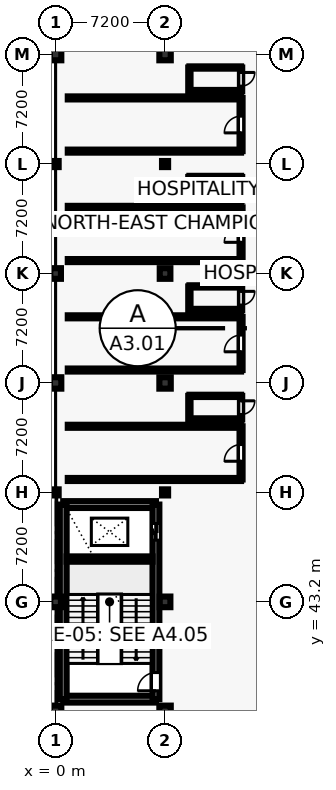
"""IFC4 building model, lengths in metres.
Left out: names, types, materials, properties, quantities, classifications, styles, units other than length and angle.
Written with IfcOpenShell. Run it as: python <this file> out.ifc"""

import sys

from ifc_helpers import new_model, si_unit, direction, frame, frame_2d, origin, origin_2d, place, context, subcontext, project, spatial, rectangle, hollow_rectangle, extrude, element, fill, save


model = new_model("IFC4")
c1 = context("Model", 3, precision=1e-05, world=origin(), true_north=direction((0.0, 1.0)))
c2 = subcontext(c1, "Body", "Model", "MODEL_VIEW")
j1 = project(units=[si_unit("LENGTHUNIT", "METRE"), si_unit("PLANEANGLEUNIT", "RADIAN")], contexts=[c1])
p1 = place(None, origin())
s1 = spatial("IfcSite", under=j1, at=p1, CompositionType="ELEMENT")
p2 = place(p1, origin())
s2 = spatial("IfcBuilding", under=s1, at=p2, CompositionType="ELEMENT")
p3 = place(p2, frame((0.0, 0.0, 9.6)))
s3 = spatial("IfcBuildingStorey", under=s2, at=p3, CompositionType="ELEMENT", Elevation=9.6)
p4 = place(p3, frame((0.0, 36.0, 0.0), z_axis=(0.0, 0.0, 1.0), x_axis=(1.0, 0.0, 0.0)))
e1 = element("IfcColumn", 1, at=p4, inside=s3, PredefinedType="COLUMN", context=c2, shape_type="SweptSolid", body=[
    extrude(rectangle(XDim=0.75, YDim=0.75, at=origin_2d()), origin(), (0.0, 0.0, 1.0), 4.2),
])
p5 = place(p3, frame((0.0, 43.2, 0.0), z_axis=(0.0, 0.0, 1.0), x_axis=(1.0, 0.0, 0.0)))
e2 = element("IfcColumn", 2, at=p5, inside=s3, PredefinedType="COLUMN", context=c2, shape_type="SweptSolid", body=[
    extrude(rectangle(XDim=0.7, YDim=0.7, at=origin_2d()), origin(), (0.0, 0.0, 1.0), 4.2),
])
p6 = place(p3, frame((0.0, 50.4, 0.0), z_axis=(0.0, 0.0, 1.0), x_axis=(1.0, 0.0, 0.0)))
e3 = element("IfcColumn", 3, at=p6, inside=s3, PredefinedType="COLUMN", context=c2, shape_type="SweptSolid", body=[
    extrude(hollow_rectangle(XDim=0.4, YDim=0.4, WallThickness=0.02, at=origin_2d()), origin(), (0.0, 0.0, 1.0), 4.2),
])
p7 = place(p3, frame((0.0, 57.6, 0.0), z_axis=(0.0, 0.0, 1.0), x_axis=(1.0, 0.0, 0.0)))
e4 = element("IfcColumn", 4, at=p7, inside=s3, PredefinedType="COLUMN", context=c2, shape_type="SweptSolid", body=[
    extrude(rectangle(XDim=0.75, YDim=0.75, at=origin_2d()), origin(), (0.0, 0.0, 1.0), 4.2),
])
p8 = place(p3, frame((0.0, 64.8, 0.0), z_axis=(0.0, 0.0, 1.0), x_axis=(1.0, 0.0, 0.0)))
e5 = element("IfcColumn", 5, at=p8, inside=s3, PredefinedType="COLUMN", context=c2, shape_type="SweptSolid", body=[
    extrude(rectangle(XDim=0.7, YDim=0.7, at=origin_2d()), origin(), (0.0, 0.0, 1.0), 4.2),
])
p9 = place(p3, frame((0.0, 72.0, 0.0), z_axis=(0.0, 0.0, 1.0), x_axis=(1.0, 0.0, 0.0)))
e6 = element("IfcColumn", 6, at=p9, inside=s3, PredefinedType="COLUMN", context=c2, shape_type="SweptSolid", body=[
    extrude(hollow_rectangle(XDim=0.4, YDim=0.4, WallThickness=0.02, at=origin_2d()), origin(), (0.0, 0.0, 1.0), 4.2),
])
for number, where, z_axis, x_axis in (
    (7, (0.0, 79.2, 0.0), (0.0, 0.0, 1.0), (1.0, 0.0, 0.0)),
    (8, (7.2, 36.0, 0.0), (0.0, 0.0, 1.0), (1.0, 0.0, 0.0)),
):
    element("IfcColumn", number, at=place(p3, frame(where, z_axis=z_axis, x_axis=x_axis)), inside=s3, PredefinedType="COLUMN", context=c2, shape_type="SweptSolid", body=[
        extrude(rectangle(XDim=0.75, YDim=0.75, at=origin_2d()), origin(), (0.0, 0.0, 1.0), 4.2),
    ])
p10 = place(p3, frame((7.2, 43.2, 0.0), z_axis=(0.0, 0.0, 1.0), x_axis=(1.0, 0.0, 0.0)))
e9 = element("IfcColumn", 9, at=p10, inside=s3, PredefinedType="COLUMN", context=c2, shape_type="SweptSolid", body=[
    extrude(rectangle(XDim=0.7, YDim=0.7, at=origin_2d()), origin(), (0.0, 0.0, 1.0), 4.2),
])
p11 = place(p3, frame((7.2, 50.4, 0.0), z_axis=(0.0, 0.0, 1.0), x_axis=(1.0, 0.0, 0.0)))
e10 = element("IfcColumn", 10, at=p11, inside=s3, PredefinedType="COLUMN", context=c2, shape_type="SweptSolid", body=[
    extrude(hollow_rectangle(XDim=0.4, YDim=0.4, WallThickness=0.02, at=origin_2d()), origin(), (0.0, 0.0, 1.0), 4.2),
])
p12 = place(p3, frame((7.2, 57.6, 0.0), z_axis=(0.0, 0.0, 1.0), x_axis=(1.0, 0.0, 0.0)))
e11 = element("IfcColumn", 11, at=p12, inside=s3, PredefinedType="COLUMN", context=c2, shape_type="SweptSolid", body=[
    extrude(rectangle(XDim=0.75, YDim=0.75, at=origin_2d()), origin(), (0.0, 0.0, 1.0), 4.2),
])
p13 = place(p3, frame((7.2, 64.8, 0.0), z_axis=(0.0, 0.0, 1.0), x_axis=(1.0, 0.0, 0.0)))
e12 = element("IfcColumn", 12, at=p13, inside=s3, PredefinedType="COLUMN", context=c2, shape_type="SweptSolid", body=[
    extrude(rectangle(XDim=0.7, YDim=0.7, at=origin_2d()), origin(), (0.0, 0.0, 1.0), 4.2),
])
p14 = place(p3, frame((7.2, 72.0, 0.0), z_axis=(0.0, 0.0, 1.0), x_axis=(1.0, 0.0, 0.0)))
e13 = element("IfcColumn", 13, at=p14, inside=s3, PredefinedType="COLUMN", context=c2, shape_type="SweptSolid", body=[
    extrude(hollow_rectangle(XDim=0.4, YDim=0.4, WallThickness=0.02, at=origin_2d()), origin(), (0.0, 0.0, 1.0), 4.2),
])
p15 = place(p3, frame((7.2, 79.2, 0.0), z_axis=(0.0, 0.0, 1.0), x_axis=(1.0, 0.0, 0.0)))
e14 = element("IfcColumn", 14, at=p15, inside=s3, PredefinedType="COLUMN", context=c2, shape_type="SweptSolid", body=[
    extrude(rectangle(XDim=0.75, YDim=0.75, at=origin_2d()), origin(), (0.0, 0.0, 1.0), 4.2),
])
for number, where, z_axis, x_axis in (
    (15, (0.5, 36.8, 0.0), (0.0, 0.0, 1.0), (1.0, 0.0, 0.0)),
    (16, (0.5, 49.6, 0.0), (0.0, 0.0, 1.0), (1.0, 0.0, 0.0)),
):
    element("IfcWall", number, at=place(p3, frame(where, z_axis=z_axis, x_axis=x_axis)), inside=s3, PredefinedType="SHEAR", context=c2, shape_type="SweptSolid", body=[
        extrude(rectangle(XDim=6.1, YDim=0.45, at=frame_2d((3.05, 0.0))), origin(), (0.0, 0.0, 1.0), 3.88),
    ])
p16 = place(p3, frame((0.5, 36.8, 0.0), z_axis=(0.0, 0.0, 1.0), x_axis=(0.0, 1.0, 0.0)))
e17 = element("IfcWall", 17, at=p16, inside=s3, PredefinedType="SHEAR", context=c2, shape_type="SweptSolid", body=[
    extrude(rectangle(XDim=12.8, YDim=0.45, at=frame_2d((6.4, 0.0))), origin(), (0.0, 0.0, 1.0), 3.88),
])
p17 = place(p3, frame((6.6, 36.8, 0.0), z_axis=(0.0, 0.0, 1.0), x_axis=(0.0, 1.0, 0.0)))
e18 = element("IfcWall", 18, at=p17, inside=s3, PredefinedType="SHEAR", context=c2, shape_type="SweptSolid", body=[
    extrude(rectangle(XDim=12.8, YDim=0.45, at=frame_2d((6.4, 0.0))), origin(), (0.0, 0.0, 1.0), 3.88),
])
p18 = place(p17, frame((0.55, 0.0, 0.0)))
e19 = element("IfcOpeningElement", 19, at=p18, cuts=e18, PredefinedType="OPENING", context=c2, shape_type="SweptSolid", body=[
    extrude(rectangle(XDim=1.2, YDim=2.25, at=frame_2d((0.6, 1.125))), frame((0.0, 0.235, 0.0), z_axis=(0.0, -1.0, 0.0), x_axis=(1.0, 0.0, 0.0)), (0.0, 0.0, 1.0), 0.47),
])
p19 = place(p17, frame((10.458, 0.0, 0.0)))
e20 = element("IfcOpeningElement", 20, at=p19, cuts=e18, PredefinedType="OPENING", context=c2, shape_type="SweptSolid", body=[
    extrude(rectangle(XDim=1.1, YDim=2.2, at=frame_2d((0.55, 1.1))), frame((0.0, 0.235, 0.0), z_axis=(0.0, -1.0, 0.0), x_axis=(1.0, 0.0, 0.0)), (0.0, 0.0, 1.0), 0.47),
])
p20 = place(p3, frame((0.725, 46.016, 0.0), z_axis=(0.0, 0.0, 1.0), x_axis=(1.0, 0.0, 0.0)))
e21 = element("IfcWall", 21, at=p20, inside=s3, PredefinedType="SHEAR", context=c2, shape_type="SweptSolid", body=[
    extrude(rectangle(XDim=5.65, YDim=0.35, at=frame_2d((2.825, 0.0))), origin(), (0.0, 0.0, 1.0), 3.88),
])
p21 = place(p3, frame((0.8, 51.25, 0.0), z_axis=(0.0, 0.0, 1.0), x_axis=(1.0, 0.0, 0.0)))
e22 = element("IfcWall", 22, at=p21, inside=s3, PredefinedType="PARTITIONING", context=c2, shape_type="SweptSolid", body=[
    extrude(rectangle(XDim=11.4, YDim=0.2, at=frame_2d((5.7, 0.0))), origin(), (0.0, 0.0, 1.0), 2.94),
])
p22 = place(p3, frame((12.2, 51.25, 0.0), z_axis=(0.0, 0.0, 1.0), x_axis=(0.0, 1.0, 0.0)))
e23 = element("IfcWall", 23, at=p22, inside=s3, PredefinedType="PARTITIONING", context=c2, shape_type="SweptSolid", body=[
    extrude(rectangle(XDim=3.5, YDim=0.2, at=frame_2d((1.75, 0.0))), origin(), (0.0, 0.0, 1.0), 2.94),
])
p23 = place(p22, frame((1.2, 0.0, 0.0)))
e24 = element("IfcOpeningElement", 24, at=p23, cuts=e23, PredefinedType="OPENING", context=c2, shape_type="SweptSolid", body=[
    extrude(rectangle(XDim=1.1, YDim=2.25, at=frame_2d((0.55, 1.125))), frame((0.0, 0.11, 0.0), z_axis=(0.0, -1.0, 0.0), x_axis=(1.0, 0.0, 0.0)), (0.0, 0.0, 1.0), 0.22),
])
p24 = place(p3, frame((12.2, 54.75, 0.0), z_axis=(0.0, 0.0, 1.0), x_axis=(-1.0, 0.0, 0.0)))
e25 = element("IfcWall", 25, at=p24, inside=s3, PredefinedType="PARTITIONING", context=c2, shape_type="SweptSolid", body=[
    extrude(rectangle(XDim=11.4, YDim=0.2, at=frame_2d((5.7, 0.0))), origin(), (0.0, 0.0, 1.0), 2.94),
])
p25 = place(p3, frame((8.8, 55.2, 0.0), z_axis=(0.0, 0.0, 1.0), x_axis=(1.0, 0.0, 0.0)))
e26 = element("IfcWall", 26, at=p25, inside=s3, PredefinedType="PARTITIONING", context=c2, shape_type="SweptSolid", body=[
    extrude(rectangle(XDim=3.4, YDim=0.15, at=frame_2d((1.7, 0.0))), origin(), (0.0, 0.0, 1.0), 2.94),
])
p26 = place(p3, frame((12.2, 55.2, 0.0), z_axis=(0.0, 0.0, 1.0), x_axis=(0.0, 1.0, 0.0)))
e27 = element("IfcWall", 27, at=p26, inside=s3, PredefinedType="PARTITIONING", context=c2, shape_type="SweptSolid", body=[
    extrude(rectangle(XDim=1.55, YDim=0.15, at=frame_2d((0.775, 0.0))), origin(), (0.0, 0.0, 1.0), 2.94),
])
p27 = place(p26, frame((0.325, 0.0, 0.0)))
e28 = element("IfcOpeningElement", 28, at=p27, cuts=e27, PredefinedType="OPENING", context=c2, shape_type="SweptSolid", body=[
    extrude(rectangle(XDim=0.9, YDim=2.15, at=frame_2d((0.45, 1.075))), frame((0.0, 0.085, 0.0), z_axis=(0.0, -1.0, 0.0), x_axis=(1.0, 0.0, 0.0)), (0.0, 0.0, 1.0), 0.17),
])
p28 = place(p3, frame((12.2, 56.75, 0.0), z_axis=(0.0, 0.0, 1.0), x_axis=(-1.0, 0.0, 0.0)))
e29 = element("IfcWall", 29, at=p28, inside=s3, PredefinedType="PARTITIONING", context=c2, shape_type="SweptSolid", body=[
    extrude(rectangle(XDim=3.4, YDim=0.15, at=frame_2d((1.7, 0.0))), origin(), (0.0, 0.0, 1.0), 2.94),
])
p29 = place(p3, frame((8.8, 56.75, 0.0), z_axis=(0.0, 0.0, 1.0), x_axis=(0.0, -1.0, 0.0)))
e30 = element("IfcWall", 30, at=p29, inside=s3, PredefinedType="PARTITIONING", context=c2, shape_type="SweptSolid", body=[
    extrude(rectangle(XDim=1.55, YDim=0.15, at=frame_2d((0.775, 0.0))), origin(), (0.0, 0.0, 1.0), 2.94),
])
p30 = place(p3, frame((0.8, 58.45, 0.0), z_axis=(0.0, 0.0, 1.0), x_axis=(1.0, 0.0, 0.0)))
e31 = element("IfcWall", 31, at=p30, inside=s3, PredefinedType="PARTITIONING", context=c2, shape_type="SweptSolid", body=[
    extrude(rectangle(XDim=11.4, YDim=0.2, at=frame_2d((5.7, 0.0))), origin(), (0.0, 0.0, 1.0), 2.94),
])
p31 = place(p3, frame((12.2, 58.45, 0.0), z_axis=(0.0, 0.0, 1.0), x_axis=(0.0, 1.0, 0.0)))
e32 = element("IfcWall", 32, at=p31, inside=s3, PredefinedType="PARTITIONING", context=c2, shape_type="SweptSolid", body=[
    extrude(rectangle(XDim=3.5, YDim=0.2, at=frame_2d((1.75, 0.0))), origin(), (0.0, 0.0, 1.0), 2.94),
])
p32 = place(p31, frame((1.2, 0.0, 0.0)))
e33 = element("IfcOpeningElement", 33, at=p32, cuts=e32, PredefinedType="OPENING", context=c2, shape_type="SweptSolid", body=[
    extrude(rectangle(XDim=1.1, YDim=2.25, at=frame_2d((0.55, 1.125))), frame((0.0, 0.11, 0.0), z_axis=(0.0, -1.0, 0.0), x_axis=(1.0, 0.0, 0.0)), (0.0, 0.0, 1.0), 0.22),
])
p33 = place(p3, frame((12.2, 61.95, 0.0), z_axis=(0.0, 0.0, 1.0), x_axis=(-1.0, 0.0, 0.0)))
e34 = element("IfcWall", 34, at=p33, inside=s3, PredefinedType="PARTITIONING", context=c2, shape_type="SweptSolid", body=[
    extrude(rectangle(XDim=11.4, YDim=0.2, at=frame_2d((5.7, 0.0))), origin(), (0.0, 0.0, 1.0), 2.94),
])
p34 = place(p3, frame((8.8, 62.4, 0.0), z_axis=(0.0, 0.0, 1.0), x_axis=(1.0, 0.0, 0.0)))
e35 = element("IfcWall", 35, at=p34, inside=s3, PredefinedType="PARTITIONING", context=c2, shape_type="SweptSolid", body=[
    extrude(rectangle(XDim=3.4, YDim=0.15, at=frame_2d((1.7, 0.0))), origin(), (0.0, 0.0, 1.0), 2.94),
])
p35 = place(p3, frame((12.2, 62.4, 0.0), z_axis=(0.0, 0.0, 1.0), x_axis=(0.0, 1.0, 0.0)))
e36 = element("IfcWall", 36, at=p35, inside=s3, PredefinedType="PARTITIONING", context=c2, shape_type="SweptSolid", body=[
    extrude(rectangle(XDim=1.55, YDim=0.15, at=frame_2d((0.775, 0.0))), origin(), (0.0, 0.0, 1.0), 2.94),
])
p36 = place(p35, frame((0.325, 0.0, 0.0)))
e37 = element("IfcOpeningElement", 37, at=p36, cuts=e36, PredefinedType="OPENING", context=c2, shape_type="SweptSolid", body=[
    extrude(rectangle(XDim=0.9, YDim=2.15, at=frame_2d((0.45, 1.075))), frame((0.0, 0.085, 0.0), z_axis=(0.0, -1.0, 0.0), x_axis=(1.0, 0.0, 0.0)), (0.0, 0.0, 1.0), 0.17),
])
p37 = place(p3, frame((12.2, 63.95, 0.0), z_axis=(0.0, 0.0, 1.0), x_axis=(-1.0, 0.0, 0.0)))
e38 = element("IfcWall", 38, at=p37, inside=s3, PredefinedType="PARTITIONING", context=c2, shape_type="SweptSolid", body=[
    extrude(rectangle(XDim=3.4, YDim=0.15, at=frame_2d((1.7, 0.0))), origin(), (0.0, 0.0, 1.0), 2.94),
])
p38 = place(p3, frame((8.8, 63.95, 0.0), z_axis=(0.0, 0.0, 1.0), x_axis=(0.0, -1.0, 0.0)))
e39 = element("IfcWall", 39, at=p38, inside=s3, PredefinedType="PARTITIONING", context=c2, shape_type="SweptSolid", body=[
    extrude(rectangle(XDim=1.55, YDim=0.15, at=frame_2d((0.775, 0.0))), origin(), (0.0, 0.0, 1.0), 2.94),
])
p39 = place(p3, frame((0.8, 65.65, 0.0), z_axis=(0.0, 0.0, 1.0), x_axis=(1.0, 0.0, 0.0)))
e40 = element("IfcWall", 40, at=p39, inside=s3, PredefinedType="PARTITIONING", context=c2, shape_type="SweptSolid", body=[
    extrude(rectangle(XDim=11.4, YDim=0.2, at=frame_2d((5.7, 0.0))), origin(), (0.0, 0.0, 1.0), 2.94),
])
p40 = place(p3, frame((12.2, 65.65, 0.0), z_axis=(0.0, 0.0, 1.0), x_axis=(0.0, 1.0, 0.0)))
e41 = element("IfcWall", 41, at=p40, inside=s3, PredefinedType="PARTITIONING", context=c2, shape_type="SweptSolid", body=[
    extrude(rectangle(XDim=3.5, YDim=0.2, at=frame_2d((1.75, 0.0))), origin(), (0.0, 0.0, 1.0), 2.94),
])
p41 = place(p40, frame((1.2, 0.0, 0.0)))
e42 = element("IfcOpeningElement", 42, at=p41, cuts=e41, PredefinedType="OPENING", context=c2, shape_type="SweptSolid", body=[
    extrude(rectangle(XDim=1.1, YDim=2.25, at=frame_2d((0.55, 1.125))), frame((0.0, 0.11, 0.0), z_axis=(0.0, -1.0, 0.0), x_axis=(1.0, 0.0, 0.0)), (0.0, 0.0, 1.0), 0.22),
])
p42 = place(p3, frame((12.2, 69.15, 0.0), z_axis=(0.0, 0.0, 1.0), x_axis=(-1.0, 0.0, 0.0)))
e43 = element("IfcWall", 43, at=p42, inside=s3, PredefinedType="PARTITIONING", context=c2, shape_type="SweptSolid", body=[
    extrude(rectangle(XDim=11.4, YDim=0.2, at=frame_2d((5.7, 0.0))), origin(), (0.0, 0.0, 1.0), 2.94),
])
p43 = place(p3, frame((8.8, 69.6, 0.0), z_axis=(0.0, 0.0, 1.0), x_axis=(1.0, 0.0, 0.0)))
e44 = element("IfcWall", 44, at=p43, inside=s3, PredefinedType="PARTITIONING", context=c2, shape_type="SweptSolid", body=[
    extrude(rectangle(XDim=3.4, YDim=0.15, at=frame_2d((1.7, 0.0))), origin(), (0.0, 0.0, 1.0), 2.94),
])
p44 = place(p3, frame((12.2, 69.6, 0.0), z_axis=(0.0, 0.0, 1.0), x_axis=(0.0, 1.0, 0.0)))
e45 = element("IfcWall", 45, at=p44, inside=s3, PredefinedType="PARTITIONING", context=c2, shape_type="SweptSolid", body=[
    extrude(rectangle(XDim=1.55, YDim=0.15, at=frame_2d((0.775, 0.0))), origin(), (0.0, 0.0, 1.0), 2.94),
])
p45 = place(p44, frame((0.325, 0.0, 0.0)))
e46 = element("IfcOpeningElement", 46, at=p45, cuts=e45, PredefinedType="OPENING", context=c2, shape_type="SweptSolid", body=[
    extrude(rectangle(XDim=0.9, YDim=2.15, at=frame_2d((0.45, 1.075))), frame((0.0, 0.085, 0.0), z_axis=(0.0, -1.0, 0.0), x_axis=(1.0, 0.0, 0.0)), (0.0, 0.0, 1.0), 0.17),
])
p46 = place(p3, frame((12.2, 71.15, 0.0), z_axis=(0.0, 0.0, 1.0), x_axis=(-1.0, 0.0, 0.0)))
e47 = element("IfcWall", 47, at=p46, inside=s3, PredefinedType="PARTITIONING", context=c2, shape_type="SweptSolid", body=[
    extrude(rectangle(XDim=3.4, YDim=0.15, at=frame_2d((1.7, 0.0))), origin(), (0.0, 0.0, 1.0), 2.94),
])
p47 = place(p3, frame((8.8, 71.15, 0.0), z_axis=(0.0, 0.0, 1.0), x_axis=(0.0, -1.0, 0.0)))
e48 = element("IfcWall", 48, at=p47, inside=s3, PredefinedType="PARTITIONING", context=c2, shape_type="SweptSolid", body=[
    extrude(rectangle(XDim=1.55, YDim=0.15, at=frame_2d((0.775, 0.0))), origin(), (0.0, 0.0, 1.0), 2.94),
])
p48 = place(p3, frame((0.8, 72.85, 0.0), z_axis=(0.0, 0.0, 1.0), x_axis=(1.0, 0.0, 0.0)))
e49 = element("IfcWall", 49, at=p48, inside=s3, PredefinedType="PARTITIONING", context=c2, shape_type="SweptSolid", body=[
    extrude(rectangle(XDim=11.4, YDim=0.2, at=frame_2d((5.7, 0.0))), origin(), (0.0, 0.0, 1.0), 2.94),
])
p49 = place(p3, frame((12.2, 72.85, 0.0), z_axis=(0.0, 0.0, 1.0), x_axis=(0.0, 1.0, 0.0)))
e50 = element("IfcWall", 50, at=p49, inside=s3, PredefinedType="PARTITIONING", context=c2, shape_type="SweptSolid", body=[
    extrude(rectangle(XDim=3.5, YDim=0.2, at=frame_2d((1.75, 0.0))), origin(), (0.0, 0.0, 1.0), 2.94),
])
p50 = place(p49, frame((1.2, 0.0, 0.0)))
e51 = element("IfcOpeningElement", 51, at=p50, cuts=e50, PredefinedType="OPENING", context=c2, shape_type="SweptSolid", body=[
    extrude(rectangle(XDim=1.1, YDim=2.25, at=frame_2d((0.55, 1.125))), frame((0.0, 0.11, 0.0), z_axis=(0.0, -1.0, 0.0), x_axis=(1.0, 0.0, 0.0)), (0.0, 0.0, 1.0), 0.22),
])
p51 = place(p3, frame((12.2, 76.35, 0.0), z_axis=(0.0, 0.0, 1.0), x_axis=(-1.0, 0.0, 0.0)))
e52 = element("IfcWall", 52, at=p51, inside=s3, PredefinedType="PARTITIONING", context=c2, shape_type="SweptSolid", body=[
    extrude(rectangle(XDim=11.4, YDim=0.2, at=frame_2d((5.7, 0.0))), origin(), (0.0, 0.0, 1.0), 2.94),
])
p52 = place(p3, frame((8.8, 76.8, 0.0), z_axis=(0.0, 0.0, 1.0), x_axis=(1.0, 0.0, 0.0)))
e53 = element("IfcWall", 53, at=p52, inside=s3, PredefinedType="PARTITIONING", context=c2, shape_type="SweptSolid", body=[
    extrude(rectangle(XDim=3.4, YDim=0.15, at=frame_2d((1.7, 0.0))), origin(), (0.0, 0.0, 1.0), 2.94),
])
p53 = place(p3, frame((12.2, 76.8, 0.0), z_axis=(0.0, 0.0, 1.0), x_axis=(0.0, 1.0, 0.0)))
e54 = element("IfcWall", 54, at=p53, inside=s3, PredefinedType="PARTITIONING", context=c2, shape_type="SweptSolid", body=[
    extrude(rectangle(XDim=1.55, YDim=0.15, at=frame_2d((0.775, 0.0))), origin(), (0.0, 0.0, 1.0), 2.94),
])
p54 = place(p53, frame((0.325, 0.0, 0.0)))
e55 = element("IfcOpeningElement", 55, at=p54, cuts=e54, PredefinedType="OPENING", context=c2, shape_type="SweptSolid", body=[
    extrude(rectangle(XDim=0.9, YDim=2.15, at=frame_2d((0.45, 1.075))), frame((0.0, 0.085, 0.0), z_axis=(0.0, -1.0, 0.0), x_axis=(1.0, 0.0, 0.0)), (0.0, 0.0, 1.0), 0.17),
])
p55 = place(p3, frame((12.2, 78.35, 0.0), z_axis=(0.0, 0.0, 1.0), x_axis=(-1.0, 0.0, 0.0)))
e56 = element("IfcWall", 56, at=p55, inside=s3, PredefinedType="PARTITIONING", context=c2, shape_type="SweptSolid", body=[
    extrude(rectangle(XDim=3.4, YDim=0.15, at=frame_2d((1.7, 0.0))), origin(), (0.0, 0.0, 1.0), 2.94),
])
p56 = place(p3, frame((8.8, 78.35, 0.0), z_axis=(0.0, 0.0, 1.0), x_axis=(0.0, -1.0, 0.0)))
e57 = element("IfcWall", 57, at=p56, inside=s3, PredefinedType="PARTITIONING", context=c2, shape_type="SweptSolid", body=[
    extrude(rectangle(XDim=1.55, YDim=0.15, at=frame_2d((0.775, 0.0))), origin(), (0.0, 0.0, 1.0), 2.94),
])
p57 = place(p18, origin())
e58 = element("IfcDoor", 58, at=p57, inside=s3, OperationType="SINGLE_SWING_LEFT", PredefinedType="DOOR", context=c2, shape_type="SweptSolid", body=[
    extrude(rectangle(XDim=1.2, YDim=2.25, at=frame_2d((0.6, 1.125))), frame((0.0, 0.025, 0.0), z_axis=(0.0, -1.0, 0.0), x_axis=(1.0, 0.0, 0.0)), (0.0, 0.0, 1.0), 0.05),
])
fill(e19, e58)
p58 = place(p19, origin())
e59 = element("IfcDoor", 59, at=p58, inside=s3, OperationType="SLIDING_TO_RIGHT", PredefinedType="DOOR", context=c2, shape_type="SweptSolid", body=[
    extrude(rectangle(XDim=1.1, YDim=2.2, at=frame_2d((0.55, 1.1))), frame((0.0, 0.025, 0.0), z_axis=(0.0, -1.0, 0.0), x_axis=(1.0, 0.0, 0.0)), (0.0, 0.0, 1.0), 0.05),
])
fill(e20, e59)
p59 = place(p23, origin())
e60 = element("IfcDoor", 60, at=p59, inside=s3, OperationType="SINGLE_SWING_LEFT", PredefinedType="DOOR", context=c2, shape_type="SweptSolid", body=[
    extrude(rectangle(XDim=1.1, YDim=2.25, at=frame_2d((0.55, 1.125))), frame((0.0, 0.025, 0.0), z_axis=(0.0, -1.0, 0.0), x_axis=(1.0, 0.0, 0.0)), (0.0, 0.0, 1.0), 0.05),
])
fill(e24, e60)
p60 = place(p27, frame((0.9, 0.0, 0.0), z_axis=(0.0, 0.0, 1.0), x_axis=(-1.0, 0.0, 0.0)))
e61 = element("IfcDoor", 61, at=p60, inside=s3, OperationType="SINGLE_SWING_RIGHT", PredefinedType="DOOR", context=c2, shape_type="SweptSolid", body=[
    extrude(rectangle(XDim=0.9, YDim=2.15, at=frame_2d((0.45, 1.075))), frame((0.0, 0.025, 0.0), z_axis=(0.0, -1.0, 0.0), x_axis=(1.0, 0.0, 0.0)), (0.0, 0.0, 1.0), 0.05),
])
fill(e28, e61)
p61 = place(p32, origin())
e62 = element("IfcDoor", 62, at=p61, inside=s3, OperationType="SINGLE_SWING_LEFT", PredefinedType="DOOR", context=c2, shape_type="SweptSolid", body=[
    extrude(rectangle(XDim=1.1, YDim=2.25, at=frame_2d((0.55, 1.125))), frame((0.0, 0.025, 0.0), z_axis=(0.0, -1.0, 0.0), x_axis=(1.0, 0.0, 0.0)), (0.0, 0.0, 1.0), 0.05),
])
fill(e33, e62)
p62 = place(p36, frame((0.9, 0.0, 0.0), z_axis=(0.0, 0.0, 1.0), x_axis=(-1.0, 0.0, 0.0)))
e63 = element("IfcDoor", 63, at=p62, inside=s3, OperationType="SINGLE_SWING_RIGHT", PredefinedType="DOOR", context=c2, shape_type="SweptSolid", body=[
    extrude(rectangle(XDim=0.9, YDim=2.15, at=frame_2d((0.45, 1.075))), frame((0.0, 0.025, 0.0), z_axis=(0.0, -1.0, 0.0), x_axis=(1.0, 0.0, 0.0)), (0.0, 0.0, 1.0), 0.05),
])
fill(e37, e63)
p63 = place(p41, origin())
e64 = element("IfcDoor", 64, at=p63, inside=s3, OperationType="SINGLE_SWING_LEFT", PredefinedType="DOOR", context=c2, shape_type="SweptSolid", body=[
    extrude(rectangle(XDim=1.1, YDim=2.25, at=frame_2d((0.55, 1.125))), frame((0.0, 0.025, 0.0), z_axis=(0.0, -1.0, 0.0), x_axis=(1.0, 0.0, 0.0)), (0.0, 0.0, 1.0), 0.05),
])
fill(e42, e64)
p64 = place(p45, frame((0.9, 0.0, 0.0), z_axis=(0.0, 0.0, 1.0), x_axis=(-1.0, 0.0, 0.0)))
e65 = element("IfcDoor", 65, at=p64, inside=s3, OperationType="SINGLE_SWING_RIGHT", PredefinedType="DOOR", context=c2, shape_type="SweptSolid", body=[
    extrude(rectangle(XDim=0.9, YDim=2.15, at=frame_2d((0.45, 1.075))), frame((0.0, 0.025, 0.0), z_axis=(0.0, -1.0, 0.0), x_axis=(1.0, 0.0, 0.0)), (0.0, 0.0, 1.0), 0.05),
])
fill(e46, e65)
p65 = place(p50, origin())
e66 = element("IfcDoor", 66, at=p65, inside=s3, OperationType="SINGLE_SWING_LEFT", PredefinedType="DOOR", context=c2, shape_type="SweptSolid", body=[
    extrude(rectangle(XDim=1.1, YDim=2.25, at=frame_2d((0.55, 1.125))), frame((0.0, 0.025, 0.0), z_axis=(0.0, -1.0, 0.0), x_axis=(1.0, 0.0, 0.0)), (0.0, 0.0, 1.0), 0.05),
])
fill(e51, e66)
p66 = place(p54, frame((0.9, 0.0, 0.0), z_axis=(0.0, 0.0, 1.0), x_axis=(-1.0, 0.0, 0.0)))
e67 = element("IfcDoor", 67, at=p66, inside=s3, OperationType="SINGLE_SWING_RIGHT", PredefinedType="DOOR", context=c2, shape_type="SweptSolid", body=[
    extrude(rectangle(XDim=0.9, YDim=2.15, at=frame_2d((0.45, 1.075))), frame((0.0, 0.025, 0.0), z_axis=(0.0, -1.0, 0.0), x_axis=(1.0, 0.0, 0.0)), (0.0, 0.0, 1.0), 0.05),
])
fill(e55, e67)
save(model, sys.argv[1])
